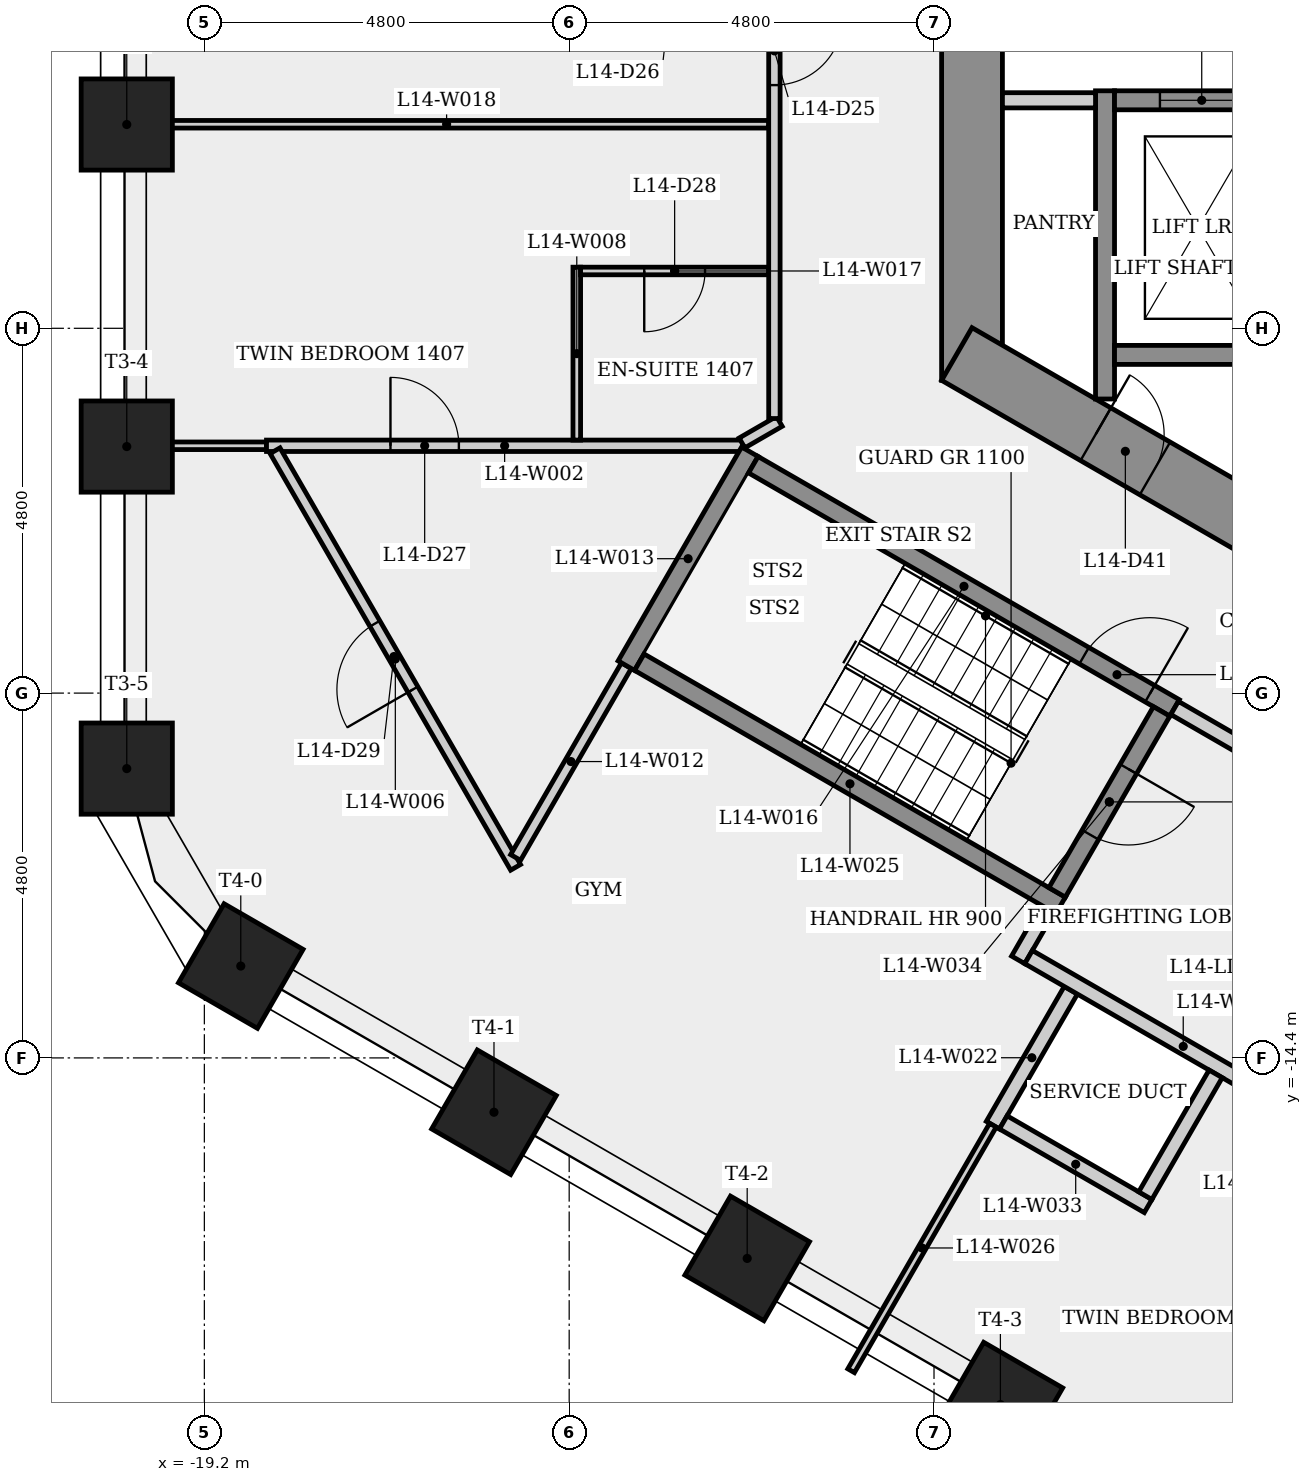
"""IFC4 building model, lengths in metres.
Left out: names, types, materials, properties, quantities, classifications, styles, units other than length and angle.
Written with IfcOpenShell. Run it as: python <this file> out.ifc"""

import sys

from ifc_helpers import new_model, si_unit, direction, frame, frame_2d, origin, origin_2d, place, context, subcontext, project, spatial, rectangle, extrude, element, fill, save


model = new_model("IFC4")
c1 = context("Model", 3, precision=1e-05, world=origin(), true_north=direction((0.0, 1.0)))
c2 = subcontext(c1, "Body", "Model", "MODEL_VIEW")
j1 = project(units=[si_unit("LENGTHUNIT", "METRE"), si_unit("PLANEANGLEUNIT", "RADIAN")], contexts=[c1])
p1 = place(None, origin())
s1 = spatial("IfcSite", under=j1, at=p1, CompositionType="ELEMENT")
p2 = place(p1, origin())
s2 = spatial("IfcBuilding", under=s1, at=p2, CompositionType="ELEMENT")
p3 = place(p2, frame((0.0, 0.0, 56.1)))
s3 = spatial("IfcBuildingStorey", under=s2, at=p3, CompositionType="ELEMENT", Elevation=56.1)
p4 = place(p3, frame((-9.1, 5.485, 0.0), z_axis=(0.0, 0.0, 1.0), x_axis=(0.0, -1.0, 0.0)))
e1 = element("IfcWall", 1, at=p4, inside=s3, PredefinedType="SHEAR", context=c2, shape_type="SweptSolid", body=[
    extrude(rectangle(XDim=10.97, YDim=0.8, at=frame_2d((5.485, 0.0))), origin(), (0.0, 0.0, 1.0), 3.4),
])
p5 = place(p4, frame((4.685, 0.0, 0.0)))
e2 = element("IfcOpeningElement", 2, at=p5, cuts=e1, PredefinedType="OPENING", context=c2, shape_type="SweptSolid", body=[
    extrude(rectangle(XDim=1.6, YDim=2.1, at=frame_2d((0.8, 1.05))), frame((0.0, 0.41, 0.0), z_axis=(0.0, -1.0, 0.0), x_axis=(1.0, 0.0, 0.0)), (0.0, 0.0, 1.0), 0.82),
])
p6 = place(p3, frame((-9.3, -5.138, 0.0), z_axis=(0.0, 0.0, 1.0), x_axis=(0.866023993627, -0.500002442456, 0.0)))
e3 = element("IfcWall", 3, at=p6, inside=s3, PredefinedType="SHEAR", context=c2, shape_type="SweptSolid", body=[
    extrude(rectangle(XDim=10.97, YDim=0.8, at=frame_2d((5.485, 0.0))), origin(), (0.0, 0.0, 1.0), 3.4),
])
p7 = place(p6, frame((2.11, 0.0, 0.0)))
e4 = element("IfcOpeningElement", 4, at=p7, cuts=e3, PredefinedType="OPENING", context=c2, shape_type="SweptSolid", body=[
    extrude(rectangle(XDim=0.9, YDim=2.1, at=frame_2d((0.45, 1.05))), frame((0.0, 0.41, 0.0), z_axis=(0.0, -1.0, 0.0), x_axis=(1.0, 0.0, 0.0)), (0.0, 0.0, 1.0), 0.82),
])
p8 = place(p6, frame((8.094, 0.0, 0.0)))
e5 = element("IfcOpeningElement", 5, at=p8, cuts=e3, PredefinedType="OPENING", context=c2, shape_type="SweptSolid", body=[
    extrude(rectangle(XDim=0.9, YDim=2.1, at=frame_2d((0.45, 1.05))), frame((0.0, 0.41, 0.0), z_axis=(0.0, -1.0, 0.0), x_axis=(1.0, 0.0, 0.0)), (0.0, 0.0, 1.0), 0.82),
])
for number, where, z_axis, x_axis in (
    (6, (-20.221, -2.119, 0.0), (0.0, 0.0, 1.0), (-1.0, 0.0, 0.0)),
    (7, (-20.221, -6.356, 0.0), (0.0, 0.0, 1.0), (-1.0, 0.0, 0.0)),
    (8, (-20.221, -10.594, 0.0), (0.0, 0.0, 1.0), (-1.0, 0.0, 0.0)),
    (9, (-18.721, -13.192, 0.0), (0.0, 0.0, 1.0), (-0.5, -0.866, 0.0)),
    (10, (-15.389, -15.115, 0.0), (0.0, 0.0, 1.0), (-0.5, -0.866, 0.0)),
    (11, (-12.058, -17.038, 0.0), (0.0, 0.0, 1.0), (-0.5, -0.866, 0.0)),
    (12, (-8.727, -18.962, 0.0), (0.0, 0.0, 1.0), (-0.5, -0.866, 0.0)),
):
    element("IfcColumn", number, at=place(p3, frame(where, z_axis=z_axis, x_axis=x_axis)), inside=s3, PredefinedType="COLUMN", context=c2, shape_type="SweptSolid", body=[
        extrude(rectangle(XDim=1.2, YDim=1.2, at=origin_2d()), origin(), (0.0, 0.0, 1.0), 3.4),
    ])
p9 = place(p3, frame((-18.382, -6.346, 0.0), z_axis=(0.0, 0.0, 1.0), x_axis=(-1.0, 0.0, 0.0)))
e13 = element("IfcWall", 13, at=p9, inside=s3, PredefinedType="PARTITIONING", context=c2, shape_type="SweptSolid", body=[
    extrude(rectangle(XDim=1.868, YDim=0.1, at=frame_2d((0.934, 0.0))), origin(), (0.0, 0.0, 1.0), 3.05),
])
p10 = place(p3, frame((-18.382, -6.346, 0.0), z_axis=(0.0, 0.0, 1.0), x_axis=(1.0, 0.0, 0.0)))
e14 = element("IfcWall", 14, at=p10, inside=s3, PredefinedType="PARTITIONING", context=c2, shape_type="SweptSolid", body=[
    extrude(rectangle(XDim=6.266, YDim=0.15, at=frame_2d((3.133, 0.0))), origin(), (0.0, 0.0, 1.0), 3.05),
])
p11 = place(p10, frame((1.631, 0.0, 0.0)))
e15 = element("IfcOpeningElement", 15, at=p11, cuts=e14, PredefinedType="OPENING", context=c2, shape_type="SweptSolid", body=[
    extrude(rectangle(XDim=0.9, YDim=2.1, at=frame_2d((0.45, 1.05))), frame((0.0, 0.085, 0.0), z_axis=(0.0, -1.0, 0.0), x_axis=(1.0, 0.0, 0.0)), (0.0, 0.0, 1.0), 0.17),
])
p12 = place(p3, frame((-15.105, -11.893, 0.0), z_axis=(0.0, 0.0, 1.0), x_axis=(-0.499976194407, 0.866039147514, 0.0)))
e16 = element("IfcWall", 16, at=p12, inside=s3, PredefinedType="PARTITIONING", context=c2, shape_type="SweptSolid", body=[
    extrude(rectangle(XDim=6.33, YDim=0.15, at=frame_2d((3.165, 0.0))), origin(), (0.0, 0.0, 1.0), 3.05),
])
p13 = place(p12, frame((2.702, 0.0, 0.0)))
e17 = element("IfcOpeningElement", 17, at=p13, cuts=e16, PredefinedType="OPENING", context=c2, shape_type="SweptSolid", body=[
    extrude(rectangle(XDim=1.0, YDim=2.1, at=frame_2d((0.5, 1.05))), frame((0.0, 0.085, 0.0), z_axis=(0.0, -1.0, 0.0), x_axis=(1.0, 0.0, 0.0)), (0.0, 0.0, 1.0), 0.17),
])
p14 = place(p3, frame((-14.3, -3.996, 0.0), z_axis=(0.0, 0.0, 1.0), x_axis=(0.0, -1.0, 0.0)))
e18 = element("IfcWall", 18, at=p14, inside=s3, PredefinedType="PARTITIONING", context=c2, shape_type="SweptSolid", body=[
    extrude(rectangle(XDim=2.275, YDim=0.1, at=frame_2d((1.137, 0.0))), origin(), (0.0, 0.0, 1.0), 3.05),
])
p15 = place(p3, frame((-13.648, -9.239, 0.0), z_axis=(0.0, 0.0, 1.0), x_axis=(-0.499959343224, -0.866048875712, 0.0)))
e19 = element("IfcWall", 19, at=p15, inside=s3, PredefinedType="PARTITIONING", context=c2, shape_type="SweptSolid", body=[
    extrude(rectangle(XDim=2.914, YDim=0.15, at=frame_2d((1.457, 0.0))), origin(), (0.0, 0.0, 1.0), 3.05),
])
p16 = place(p3, frame((-13.648, -9.239, 0.0), z_axis=(0.0, 0.0, 1.0), x_axis=(0.500017246033, 0.866015446554, 0.0)))
e20 = element("IfcWall", 20, at=p16, inside=s3, PredefinedType="SHEAR", context=c2, shape_type="SweptSolid", body=[
    extrude(rectangle(XDim=3.25, YDim=0.25, at=frame_2d((1.625, 0.0))), origin(), (0.0, 0.0, 1.0), 3.05),
])
p17 = place(p3, frame((-12.126, -6.308, 0.0), z_axis=(0.0, 0.0, 1.0), x_axis=(0.865956205248, 0.500119836232, 0.0)))
e21 = element("IfcWall", 21, at=p17, inside=s3, PredefinedType="PARTITIONING", context=c2, shape_type="SweptSolid", body=[
    extrude(rectangle(XDim=0.567, YDim=0.15, at=frame_2d((0.284, 0.0))), origin(), (0.0, 0.0, 1.0), 3.05),
])
p18 = place(p3, frame((-11.977, -6.595, 0.0), z_axis=(0.0, 0.0, 1.0), x_axis=(0.866025499775, -0.499999833739, 0.0)))
e22 = element("IfcWall", 22, at=p18, inside=s3, PredefinedType="SHEAR", context=c2, shape_type="SweptSolid", body=[
    extrude(rectangle(XDim=6.4, YDim=0.25, at=frame_2d((3.2, 0.0))), origin(), (0.0, 0.0, 1.0), 3.05),
])
p19 = place(p18, frame((5.025, 0.0, 0.0)))
e23 = element("IfcOpeningElement", 23, at=p19, cuts=e22, PredefinedType="OPENING", context=c2, shape_type="SweptSolid", body=[
    extrude(rectangle(XDim=1.0, YDim=2.1, at=frame_2d((0.5, 1.05))), frame((0.0, 0.135, 0.0), z_axis=(0.0, -1.0, 0.0), x_axis=(1.0, 0.0, 0.0)), (0.0, 0.0, 1.0), 0.27),
])
p20 = place(p3, frame((-11.775, -4.046, 0.0), z_axis=(0.0, 0.0, 1.0), x_axis=(-1.0, 0.0, 0.0)))
e24 = element("IfcWall", 24, at=p20, inside=s3, PredefinedType="PARTITIONING", context=c2, shape_type="SweptSolid", body=[
    extrude(rectangle(XDim=2.475, YDim=0.1, at=frame_2d((1.238, 0.0))), origin(), (0.0, 0.0, 1.0), 3.05),
])
p21 = place(p20, frame((0.837, 0.0, 0.0)))
e25 = element("IfcOpeningElement", 25, at=p21, cuts=e24, PredefinedType="OPENING", context=c2, shape_type="SweptSolid", body=[
    extrude(rectangle(XDim=0.8, YDim=2.1, at=frame_2d((0.4, 1.05))), frame((0.0, 0.06, 0.0), z_axis=(0.0, -1.0, 0.0), x_axis=(1.0, 0.0, 0.0)), (0.0, 0.0, 1.0), 0.12),
])
p22 = place(p3, frame((-11.775, -2.115, 0.0), z_axis=(0.0, 0.0, 1.0), x_axis=(-1.0, 0.0, 0.0)))
e26 = element("IfcWall", 26, at=p22, inside=s3, PredefinedType="PARTITIONING", context=c2, shape_type="SweptSolid", body=[
    extrude(rectangle(XDim=8.476, YDim=0.1, at=frame_2d((4.238, 0.0))), origin(), (0.0, 0.0, 1.0), 3.05),
])
p23 = place(p3, frame((-11.7, 6.137, 0.0), z_axis=(0.0, 0.0, 1.0), x_axis=(0.0, -1.0, 0.0)))
e27 = element("IfcWall", 27, at=p23, inside=s3, PredefinedType="PARTITIONING", context=c2, shape_type="SweptSolid", body=[
    extrude(rectangle(XDim=12.125, YDim=0.15, at=frame_2d((6.062, 0.0))), origin(), (0.0, 0.0, 1.0), 3.05),
])
p24 = place(p23, frame((6.837, 0.0, 0.0)))
e28 = element("IfcOpeningElement", 28, at=p24, cuts=e27, PredefinedType="OPENING", context=c2, shape_type="SweptSolid", body=[
    extrude(rectangle(XDim=0.9, YDim=2.1, at=frame_2d((0.45, 1.05))), frame((0.0, 0.085, 0.0), z_axis=(0.0, -1.0, 0.0), x_axis=(1.0, 0.0, 0.0)), (0.0, 0.0, 1.0), 0.17),
])
p25 = place(p3, frame((-8.825, -15.285, 0.0), z_axis=(0.0, 0.0, 1.0), x_axis=(0.499956128963, 0.866050731258, 0.0)))
e29 = element("IfcWall", 29, at=p25, inside=s3, PredefinedType="PLUMBINGWALL", context=c2, shape_type="SweptSolid", body=[
    extrude(rectangle(XDim=2.05, YDim=0.2, at=frame_2d((1.025, 0.0))), origin(), (0.0, 0.0, 1.0), 3.05),
])
p26 = place(p3, frame((-8.493, -13.11, 0.0), z_axis=(0.0, 0.0, 1.0), x_axis=(0.500067724834, 0.865986299303, 0.0)))
e30 = element("IfcWall", 30, at=p26, inside=s3, PredefinedType="PARTITIONING", context=c2, shape_type="SweptSolid", body=[
    extrude(rectangle(XDim=0.775, YDim=0.2, at=frame_2d((0.388, 0.0))), origin(), (0.0, 0.0, 1.0), 3.05),
])
p27 = place(p3, frame((-7.935, -12.393, 0.0), z_axis=(0.0, 0.0, 1.0), x_axis=(-0.866025499775, 0.499999833739, 0.0)))
e31 = element("IfcWall", 31, at=p27, inside=s3, PredefinedType="SHEAR", context=c2, shape_type="SweptSolid", body=[
    extrude(rectangle(XDim=6.4, YDim=0.25, at=frame_2d((3.2, 0.0))), origin(), (0.0, 0.0, 1.0), 3.05),
])
p28 = place(p3, frame((-10.69, -18.516, 0.0), z_axis=(0.0, 0.0, 1.0), x_axis=(0.49999626415, 0.866027560668, 0.0)))
e32 = element("IfcWall", 32, at=p28, inside=s3, PredefinedType="PARTITIONING", context=c2, shape_type="SweptSolid", body=[
    extrude(rectangle(XDim=3.73, YDim=0.1, at=frame_2d((1.865, 0.0))), origin(), (0.0, 0.0, 1.0), 3.05),
])
p29 = place(p3, frame((-8.356, -13.073, 0.0), z_axis=(0.0, 0.0, 1.0), x_axis=(0.866038532462, -0.499977259774, 0.0)))
e33 = element("IfcWall", 33, at=p29, inside=s3, PredefinedType="PARTITIONING", context=c2, shape_type="SweptSolid", body=[
    extrude(rectangle(XDim=4.7, YDim=0.2, at=frame_2d((2.35, 0.0))), origin(), (0.0, 0.0, 1.0), 3.05),
])
p30 = place(p3, frame((-7.35, -5.73, 0.0), z_axis=(0.0, 0.0, 1.0), x_axis=(0.0, 1.0, 0.0)))
e34 = element("IfcWall", 34, at=p30, inside=s3, PredefinedType="SHEAR", context=c2, shape_type="SweptSolid", body=[
    extrude(rectangle(XDim=4.055, YDim=0.25, at=frame_2d((2.028, 0.0))), origin(), (0.0, 0.0, 1.0), 3.05),
])
p31 = place(p3, frame((-7.475, -1.8, 0.0), z_axis=(0.0, 0.0, 1.0), x_axis=(-1.0, 0.0, 0.0)))
e35 = element("IfcWall", 35, at=p31, inside=s3, PredefinedType="PARTITIONING", context=c2, shape_type="SweptSolid", body=[
    extrude(rectangle(XDim=1.225, YDim=0.2, at=frame_2d((0.613, 0.0))), origin(), (0.0, 0.0, 1.0), 3.05),
])
p32 = place(p3, frame((-6.783, -16.349, 0.0), z_axis=(0.0, 0.0, 1.0), x_axis=(-0.866008176907, 0.50002983664, 0.0)))
e36 = element("IfcWall", 36, at=p32, inside=s3, PredefinedType="PLUMBINGWALL", context=c2, shape_type="SweptSolid", body=[
    extrude(rectangle(XDim=2.2, YDim=0.2, at=frame_2d((1.1, 0.0))), origin(), (0.0, 0.0, 1.0), 3.05),
])
p33 = place(p3, frame((-6.605, -9.841, 0.0), z_axis=(0.0, 0.0, 1.0), x_axis=(-0.499996545922, -0.866027397988, 0.0)))
e37 = element("IfcWall", 37, at=p33, inside=s3, PredefinedType="SHEAR", context=c2, shape_type="SweptSolid", body=[
    extrude(rectangle(XDim=2.75, YDim=0.25, at=frame_2d((1.375, 0.0))), origin(), (0.0, 0.0, 1.0), 3.05),
])
p34 = place(p33, frame((0.875, 0.0, 0.0)))
e38 = element("IfcOpeningElement", 38, at=p34, cuts=e37, PredefinedType="OPENING", context=c2, shape_type="SweptSolid", body=[
    extrude(rectangle(XDim=1.0, YDim=2.1, at=frame_2d((0.5, 1.05))), frame((0.0, 0.135, 0.0), z_axis=(0.0, -1.0, 0.0), x_axis=(1.0, 0.0, 0.0)), (0.0, 0.0, 1.0), 0.27),
])
p35 = place(p3, frame((-6.435, -9.795, 0.0), z_axis=(0.0, 0.0, 1.0), x_axis=(0.866012907634, -0.500021643343, 0.0)))
e39 = element("IfcWall", 39, at=p35, inside=s3, PredefinedType="PARTITIONING", context=c2, shape_type="SweptSolid", body=[
    extrude(rectangle(XDim=4.45, YDim=0.2, at=frame_2d((2.225, 0.0))), origin(), (0.0, 0.0, 1.0), 3.05),
])
p36 = place(p35, frame((1.675, 0.0, 0.0)))
e40 = element("IfcOpeningElement", 40, at=p36, cuts=e39, PredefinedType="OPENING", context=c2, shape_type="SweptSolid", body=[
    extrude(rectangle(XDim=1.1, YDim=2.1, at=frame_2d((0.55, 1.05))), frame((0.0, 0.11, 0.0), z_axis=(0.0, -1.0, 0.0), x_axis=(1.0, 0.0, 0.0)), (0.0, 0.0, 1.0), 0.22),
])
p37 = place(p3, frame((-5.895, -14.61, 0.0), z_axis=(0.0, 0.0, 1.0), x_axis=(-0.500042316284, -0.866000971088, 0.0)))
e41 = element("IfcWall", 41, at=p37, inside=s3, PredefinedType="PLUMBINGWALL", context=c2, shape_type="SweptSolid", body=[
    extrude(rectangle(XDim=1.85, YDim=0.2, at=frame_2d((0.925, 0.0))), origin(), (0.0, 0.0, 1.0), 3.05),
])
p38 = place(p3, frame((-7.225, -5.15, 0.0), z_axis=(0.0, 0.0, 1.0), x_axis=(1.0, 0.0, 0.0)))
e42 = element("IfcWall", 42, at=p38, inside=s3, PredefinedType="SHEAR", context=c2, shape_type="SweptSolid", body=[
    extrude(rectangle(XDim=14.7, YDim=0.25, at=frame_2d((7.35, 0.0))), origin(), (0.0, 0.0, 1.0), 3.05),
])
p39 = place(p3, frame((-7.225, -1.8, 0.0), z_axis=(0.0, 0.0, 1.0), x_axis=(1.0, 0.0, 0.0)))
e43 = element("IfcWall", 43, at=p39, inside=s3, PredefinedType="SHEAR", context=c2, shape_type="SweptSolid", body=[
    extrude(rectangle(XDim=14.7, YDim=0.25, at=frame_2d((7.35, 0.0))), origin(), (0.0, 0.0, 1.0), 3.05),
])
p40 = place(p39, frame((0.597, 0.0, 0.0)))
e44 = element("IfcOpeningElement", 44, at=p40, cuts=e43, PredefinedType="OPENING", context=c2, shape_type="SweptSolid", body=[
    extrude(rectangle(XDim=1.1, YDim=2.1, at=frame_2d((0.55, 1.05))), frame((0.0, 0.135, 0.0), z_axis=(0.0, -1.0, 0.0), x_axis=(1.0, 0.0, 0.0)), (0.0, 0.0, 1.0), 0.27),
])
p41 = place(p39, frame((3.0, 0.0, 0.0)))
e45 = element("IfcOpeningElement", 45, at=p41, cuts=e43, PredefinedType="OPENING", context=c2, shape_type="SweptSolid", body=[
    extrude(rectangle(XDim=1.1, YDim=2.1, at=frame_2d((0.55, 1.05))), frame((0.0, 0.135, 0.0), z_axis=(0.0, -1.0, 0.0), x_axis=(1.0, 0.0, 0.0)), (0.0, 0.0, 1.0), 0.27),
])
p42 = place(p39, frame((5.45, 0.0, 0.0)))
e46 = element("IfcOpeningElement", 46, at=p42, cuts=e43, PredefinedType="OPENING", context=c2, shape_type="SweptSolid", body=[
    extrude(rectangle(XDim=1.1, YDim=2.1, at=frame_2d((0.55, 1.05))), frame((0.0, 0.135, 0.0), z_axis=(0.0, -1.0, 0.0), x_axis=(1.0, 0.0, 0.0)), (0.0, 0.0, 1.0), 0.27),
])
p43 = place(p39, frame((7.9, 0.0, 0.0)))
e47 = element("IfcOpeningElement", 47, at=p43, cuts=e43, PredefinedType="OPENING", context=c2, shape_type="SweptSolid", body=[
    extrude(rectangle(XDim=1.1, YDim=2.1, at=frame_2d((0.55, 1.05))), frame((0.0, 0.135, 0.0), z_axis=(0.0, -1.0, 0.0), x_axis=(1.0, 0.0, 0.0)), (0.0, 0.0, 1.0), 0.27),
])
p44 = place(p39, frame((10.35, 0.0, 0.0)))
e48 = element("IfcOpeningElement", 48, at=p44, cuts=e43, PredefinedType="OPENING", context=c2, shape_type="SweptSolid", body=[
    extrude(rectangle(XDim=1.1, YDim=2.1, at=frame_2d((0.55, 1.05))), frame((0.0, 0.135, 0.0), z_axis=(0.0, -1.0, 0.0), x_axis=(1.0, 0.0, 0.0)), (0.0, 0.0, 1.0), 0.27),
])
p45 = place(p40, origin())
e49 = element("IfcDoor", 49, at=p45, inside=s3, OperationType="SLIDING_TO_LEFT", PredefinedType="DOOR", context=c2, shape_type="SweptSolid", body=[
    extrude(rectangle(XDim=1.1, YDim=2.1, at=frame_2d((0.55, 1.05))), frame((0.0, 0.025, 0.0), z_axis=(0.0, -1.0, 0.0), x_axis=(1.0, 0.0, 0.0)), (0.0, 0.0, 1.0), 0.05),
])
fill(e44, e49)
p46 = place(p19, origin())
e50 = element("IfcDoor", 50, at=p46, inside=s3, OperationType="SINGLE_SWING_RIGHT", PredefinedType="DOOR", context=c2, shape_type="SweptSolid", body=[
    extrude(rectangle(XDim=1.0, YDim=2.1, at=frame_2d((0.5, 1.05))), frame((0.0, 0.025, 0.0), z_axis=(0.0, -1.0, 0.0), x_axis=(1.0, 0.0, 0.0)), (0.0, 0.0, 1.0), 0.05),
])
fill(e23, e50)
p47 = place(p34, origin())
e51 = element("IfcDoor", 51, at=p47, inside=s3, OperationType="SINGLE_SWING_LEFT", PredefinedType="DOOR", context=c2, shape_type="SweptSolid", body=[
    extrude(rectangle(XDim=1.0, YDim=2.1, at=frame_2d((0.5, 1.05))), frame((0.0, 0.025, 0.0), z_axis=(0.0, -1.0, 0.0), x_axis=(1.0, 0.0, 0.0)), (0.0, 0.0, 1.0), 0.05),
])
fill(e38, e51)
p48 = place(p24, origin())
e52 = element("IfcDoor", 52, at=p48, inside=s3, OperationType="SINGLE_SWING_LEFT", PredefinedType="DOOR", context=c2, shape_type="SweptSolid", body=[
    extrude(rectangle(XDim=0.9, YDim=2.1, at=frame_2d((0.45, 1.05))), frame((0.0, 0.025, 0.0), z_axis=(0.0, -1.0, 0.0), x_axis=(1.0, 0.0, 0.0)), (0.0, 0.0, 1.0), 0.05),
])
fill(e28, e52)
p49 = place(p11, origin())
e53 = element("IfcDoor", 53, at=p49, inside=s3, OperationType="SINGLE_SWING_LEFT", PredefinedType="DOOR", context=c2, shape_type="SweptSolid", body=[
    extrude(rectangle(XDim=0.9, YDim=2.1, at=frame_2d((0.45, 1.05))), frame((0.0, 0.025, 0.0), z_axis=(0.0, -1.0, 0.0), x_axis=(1.0, 0.0, 0.0)), (0.0, 0.0, 1.0), 0.05),
])
fill(e15, e53)
p50 = place(p21, origin())
e54 = element("IfcDoor", 54, at=p50, inside=s3, OperationType="SINGLE_SWING_RIGHT", PredefinedType="DOOR", context=c2, shape_type="SweptSolid", body=[
    extrude(rectangle(XDim=0.8, YDim=2.1, at=frame_2d((0.4, 1.05))), frame((0.0, 0.025, 0.0), z_axis=(0.0, -1.0, 0.0), x_axis=(1.0, 0.0, 0.0)), (0.0, 0.0, 1.0), 0.05),
])
fill(e25, e54)
p51 = place(p13, origin())
e55 = element("IfcDoor", 55, at=p51, inside=s3, OperationType="SINGLE_SWING_LEFT", PredefinedType="DOOR", context=c2, shape_type="SweptSolid", body=[
    extrude(rectangle(XDim=1.0, YDim=2.1, at=frame_2d((0.5, 1.05))), frame((0.0, 0.025, 0.0), z_axis=(0.0, -1.0, 0.0), x_axis=(1.0, 0.0, 0.0)), (0.0, 0.0, 1.0), 0.05),
])
fill(e17, e55)
p52 = place(p7, origin())
e56 = element("IfcDoor", 56, at=p52, inside=s3, OperationType="SINGLE_SWING_LEFT", PredefinedType="DOOR", context=c2, shape_type="SweptSolid", body=[
    extrude(rectangle(XDim=0.9, YDim=2.1, at=frame_2d((0.45, 1.05))), frame((0.0, 0.025, 0.0), z_axis=(0.0, -1.0, 0.0), x_axis=(1.0, 0.0, 0.0)), (0.0, 0.0, 1.0), 0.05),
])
fill(e4, e56)
save(model, sys.argv[1])
